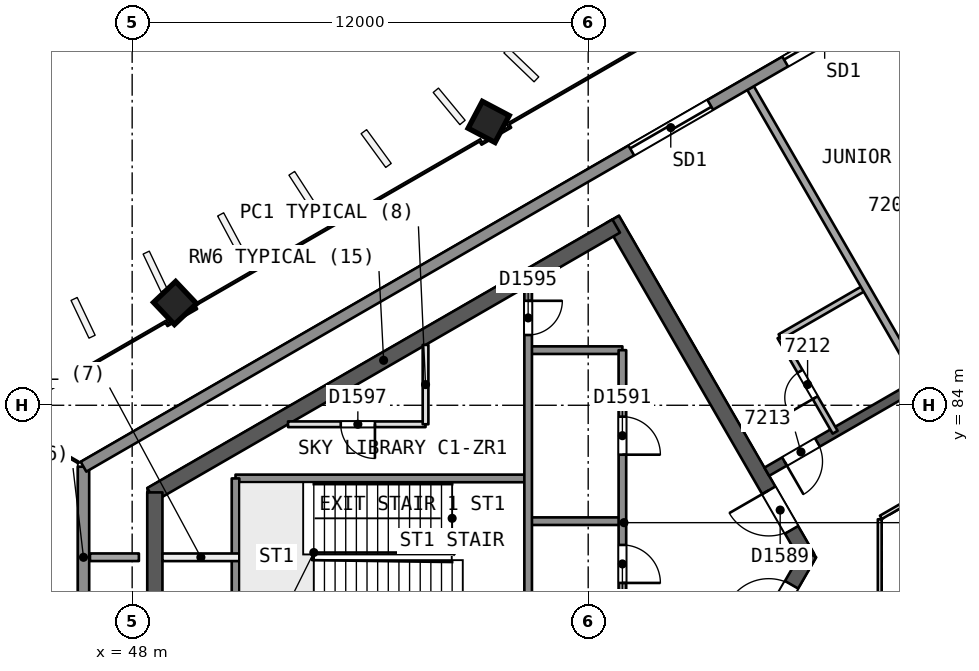
"""IFC4 building model, lengths in metres.
Left out: names, types, materials, properties, quantities, classifications, styles, units other than length and angle.
Written with IfcOpenShell. Run it as: python <this file> out.ifc"""

import sys

from ifc_helpers import new_model, si_unit, direction, frame, frame_2d, origin, origin_2d, place, context, subcontext, project, spatial, rectangle, extrude, element, fill, save


model = new_model("IFC4")
c1 = context("Model", 3, precision=1e-05, world=origin(), true_north=direction((0.0, 1.0)))
c2 = subcontext(c1, "Body", "Model", "MODEL_VIEW")
j1 = project(units=[si_unit("LENGTHUNIT", "METRE"), si_unit("PLANEANGLEUNIT", "RADIAN")], contexts=[c1])
p1 = place(None, origin())
s1 = spatial("IfcSite", under=j1, at=p1, CompositionType="ELEMENT")
p2 = place(p1, origin())
s2 = spatial("IfcBuilding", under=s1, at=p2, CompositionType="ELEMENT")
p3 = place(p2, frame((0.0, 0.0, 292.3)))
s3 = spatial("IfcBuildingStorey", under=s2, at=p3, CompositionType="ELEMENT", Elevation=292.3)
p4 = place(p3, frame((65.769, 80.0, 0.0), z_axis=(0.0, 0.0, 1.0), x_axis=(-0.50000177223, 0.866024380585, 0.0)))
e1 = element("IfcWall", 1, at=p4, inside=s3, PredefinedType="SHEAR", context=c2, shape_type="SweptSolid", body=[
    extrude(rectangle(XDim=10.265, YDim=0.4, at=frame_2d((5.132, 0.0))), origin(), (0.0, 0.0, 1.0), 3.7),
])
p5 = place(p4, frame((0.834, 0.0, 0.0)))
e2 = element("IfcOpeningElement", 2, at=p5, cuts=e1, PredefinedType="OPENING", context=c2, shape_type="SweptSolid", body=[
    extrude(rectangle(XDim=1.2, YDim=2.1, at=frame_2d((0.6, 1.05))), frame((0.0, 0.21, 0.0), z_axis=(0.0, -1.0, 0.0), x_axis=(1.0, 0.0, 0.0)), (0.0, 0.0, 1.0), 0.421),
])
p6 = place(p3, frame((60.737, 88.716, 0.0), z_axis=(0.0, 0.0, 1.0), x_axis=(-0.866028812667, -0.499994095595, 0.0)))
e3 = element("IfcWall", 3, at=p6, inside=s3, PredefinedType="SHEAR", context=c2, shape_type="SweptSolid", body=[
    extrude(rectangle(XDim=14.134, YDim=0.4, at=frame_2d((7.067, 0.0))), origin(), (0.0, 0.0, 1.0), 3.7),
])
p7 = place(p3, frame((48.597, 81.707, 0.0), z_axis=(0.0, 0.0, 1.0), x_axis=(0.0, -1.0, 0.0)))
e4 = element("IfcWall", 4, at=p7, inside=s3, PredefinedType="SHEAR", context=c2, shape_type="SweptSolid", body=[
    extrude(rectangle(XDim=3.53, YDim=0.4, at=frame_2d((1.765, 0.0))), origin(), (0.0, 0.0, 1.0), 3.7),
])
p8 = place(p3, frame((60.737, 71.284, 0.0), z_axis=(0.0, 0.0, 1.0), x_axis=(0.50000547566, 0.866022242388, 0.0)))
e5 = element("IfcWall", 5, at=p8, inside=s3, PredefinedType="SHEAR", context=c2, shape_type="SweptSolid", body=[
    extrude(rectangle(XDim=10.18, YDim=0.4, at=frame_2d((5.09, 0.0))), origin(), (0.0, 0.0, 1.0), 3.7),
])
p9 = place(p8, frame((8.03, 0.0, 0.0)))
e6 = element("IfcOpeningElement", 6, at=p9, cuts=e5, PredefinedType="OPENING", context=c2, shape_type="SweptSolid", body=[
    extrude(rectangle(XDim=1.2, YDim=2.1, at=frame_2d((0.6, 1.05))), frame((0.0, 0.21, 0.0), z_axis=(0.0, -1.0, 0.0), x_axis=(1.0, 0.0, 0.0)), (0.0, 0.0, 1.0), 0.421),
])
p10 = place(p3, frame((78.2, 90.046, 0.0), z_axis=(0.0, 0.0, 1.0), x_axis=(-0.866026492143, -0.499998114903, 0.0)))
e7 = element("IfcWall", 7, at=p10, inside=s3, PredefinedType="SHEAR", context=c2, shape_type="SweptSolid", body=[
    extrude(rectangle(XDim=15.588, YDim=0.25, at=frame_2d((7.794, 0.0))), origin(), (0.0, 0.0, 1.0), 3.35),
])
p11 = place(p10, frame((4.718, 0.0, 0.0)))
e8 = element("IfcOpeningElement", 8, at=p11, cuts=e7, PredefinedType="OPENING", context=c2, shape_type="SweptSolid", body=[
    extrude(rectangle(XDim=1.0, YDim=2.1, at=frame_2d((0.5, 1.05))), frame((0.0, 0.135, 0.0), z_axis=(0.0, -1.0, 0.0), x_axis=(1.0, 0.0, 0.0)), (0.0, 0.0, 1.0), 0.271),
])
p12 = place(p10, frame((9.374, 0.0, 0.0)))
e9 = element("IfcOpeningElement", 9, at=p12, cuts=e7, PredefinedType="OPENING", context=c2, shape_type="SweptSolid", body=[
    extrude(rectangle(XDim=1.0, YDim=2.1, at=frame_2d((0.5, 1.05))), frame((0.0, 0.135, 0.0), z_axis=(0.0, -1.0, 0.0), x_axis=(1.0, 0.0, 0.0)), (0.0, 0.0, 1.0), 0.271),
])
p13 = place(p10, frame((14.05, 0.0, 0.0)))
e10 = element("IfcOpeningElement", 10, at=p13, cuts=e7, PredefinedType="OPENING", context=c2, shape_type="SweptSolid", body=[
    extrude(rectangle(XDim=1.0, YDim=2.1, at=frame_2d((0.5, 1.05))), frame((0.0, 0.135, 0.0), z_axis=(0.0, -1.0, 0.0), x_axis=(1.0, 0.0, 0.0)), (0.0, 0.0, 1.0), 0.271),
])
p14 = place(p3, frame((57.359, 91.47, 0.0), z_axis=(0.019328516974, -0.012138044789, 0.999739504221), x_axis=(-0.500208848309, 0.865669585777, 0.020181088508)))
e11 = element("IfcColumn", 11, at=p14, inside=s3, PredefinedType="COLUMN", context=c2, shape_type="SweptSolid", body=[
    extrude(rectangle(XDim=0.8, YDim=0.8, at=origin_2d()), origin(), (0.0, 0.0, 1.0), 3.701),
])
p15 = place(p3, frame((49.094, 86.699, 0.0), z_axis=(0.028559101991, -0.006859460986, 0.999568569678), x_axis=(-0.498513358127, 0.866646856607, 0.020190534949)))
e12 = element("IfcColumn", 12, at=p15, inside=s3, PredefinedType="COLUMN", context=c2, shape_type="SweptSolid", body=[
    extrude(rectangle(XDim=0.8, YDim=0.8, at=origin_2d()), origin(), (0.0, 0.0, 1.0), 3.702),
])
p16 = place(p3, frame((64.272, 92.345, 0.0), z_axis=(0.0, 0.0, 1.0), x_axis=(0.500006420084, -0.866021697116, 0.0)))
e13 = element("IfcWall", 13, at=p16, inside=s3, PredefinedType="PARTITIONING", context=c2, shape_type="SweptSolid", body=[
    extrude(rectangle(XDim=8.956, YDim=0.2, at=frame_2d((4.478, 0.0))), origin(), (0.0, 0.0, 1.0), 3.35),
])
p17 = place(p3, frame((66.498, 83.29, 0.0), z_axis=(0.0, 0.0, 1.0), x_axis=(-0.499987231761, 0.866032775405, 0.0)))
e14 = element("IfcWall", 14, at=p17, inside=s3, PredefinedType="PARTITIONING", context=c2, shape_type="SweptSolid", body=[
    extrude(rectangle(XDim=2.9, YDim=0.15, at=frame_2d((1.45, 0.0))), origin(), (0.0, 0.0, 1.0), 3.35),
])
p18 = place(p17, frame((1.05, 0.0, 0.0)))
e15 = element("IfcOpeningElement", 15, at=p18, cuts=e14, PredefinedType="OPENING", context=c2, shape_type="SweptSolid", body=[
    extrude(rectangle(XDim=0.8, YDim=2.1, at=frame_2d((0.4, 1.05))), frame((0.0, 0.085, 0.0), z_axis=(0.0, -1.0, 0.0), x_axis=(1.0, 0.0, 0.0)), (0.0, 0.0, 1.0), 0.171),
])
p19 = place(p3, frame((65.048, 85.802, 0.0), z_axis=(0.0, 0.0, 1.0), x_axis=(0.866062058628, 0.499936506574, 0.0)))
e16 = element("IfcWall", 16, at=p19, inside=s3, PredefinedType="PARTITIONING", context=c2, shape_type="SweptSolid", body=[
    extrude(rectangle(XDim=2.6, YDim=0.15, at=frame_2d((1.3, 0.0))), origin(), (0.0, 0.0, 1.0), 3.35),
])
p20 = place(p3, frame((46.889, 80.001, 0.0), z_axis=(0.0, 0.0, 1.0), x_axis=(1.0, 0.0, 0.0)))
e17 = element("IfcWall", 17, at=p20, inside=s3, PredefinedType="PARTITIONING", context=c2, shape_type="SweptSolid", body=[
    extrude(rectangle(XDim=1.288, YDim=0.2, at=frame_2d((0.644, 0.0))), origin(), (0.0, 0.0, 1.0), 3.35),
])
p21 = place(p3, frame((46.719, 77.617, 0.0), z_axis=(0.0, 0.0, 1.0), x_axis=(0.0, 1.0, 0.0)))
e18 = element("IfcWall", 18, at=p21, inside=s3, PredefinedType="SOLIDWALL", context=c2, shape_type="SweptSolid", body=[
    extrude(rectangle(XDim=4.767, YDim=0.3, at=frame_2d((2.383, 0.0))), origin(), (0.0, 0.0, 1.0), 3.35),
])
p22 = place(p3, frame((46.719, 82.383, 0.0), z_axis=(0.0, 0.0, 1.0), x_axis=(0.866026104534, 0.499998786264, 0.0)))
e19 = element("IfcWall", 19, at=p22, inside=s3, PredefinedType="SOLIDWALL", context=c2, shape_type="SweptSolid", body=[
    extrude(rectangle(XDim=46.601, YDim=0.3, at=frame_2d((23.3, 0.0))), origin(), (0.0, 0.0, 1.0), 3.35),
])
p23 = place(p22, frame((16.644, 0.0, 0.0)))
e20 = element("IfcOpeningElement", 20, at=p23, cuts=e19, PredefinedType="OPENING", context=c2, shape_type="SweptSolid", body=[
    extrude(rectangle(XDim=2.4, YDim=2.4, at=frame_2d((1.2, 1.2))), frame((0.0, 0.161, 0.0), z_axis=(0.0, -1.0, 0.0), x_axis=(1.0, 0.0, 0.0)), (0.0, 0.0, 1.0), 0.321),
])
p24 = place(p22, frame((26.777, 0.0, 0.0)))
e21 = element("IfcOpeningElement", 21, at=p24, cuts=e19, PredefinedType="OPENING", context=c2, shape_type="SweptSolid", body=[
    extrude(rectangle(XDim=2.4, YDim=2.4, at=frame_2d((1.2, 1.2))), frame((0.0, 0.161, 0.0), z_axis=(0.0, -1.0, 0.0), x_axis=(1.0, 0.0, 0.0)), (0.0, 0.0, 1.0), 0.321),
])
p25 = place(p22, frame((21.321, 0.0, 0.0)))
e22 = element("IfcOpeningElement", 22, at=p25, cuts=e19, PredefinedType="OPENING", context=c2, shape_type="SweptSolid", body=[
    extrude(rectangle(XDim=2.4, YDim=2.4, at=frame_2d((1.2, 1.2))), frame((0.0, 0.161, 0.0), z_axis=(0.0, -1.0, 0.0), x_axis=(1.0, 0.0, 0.0)), (0.0, 0.0, 1.0), 0.321),
])
p26 = place(p3, frame((60.9, 85.45, 0.0), z_axis=(0.0, 0.0, 1.0), x_axis=(-1.0, 0.0, 0.0)))
e23 = element("IfcWall", 23, at=p26, inside=s3, PredefinedType="SOLIDWALL", context=c2, shape_type="SweptSolid", body=[
    extrude(rectangle(XDim=2.48, YDim=0.2, at=frame_2d((1.24, 0.0))), origin(), (0.0, 0.0, 1.0), 3.35),
])
p27 = place(p3, frame((55.72, 83.5, 0.0), z_axis=(0.0, 0.0, 1.0), x_axis=(-1.0, 0.0, 0.0)))
e24 = element("IfcWall", 24, at=p27, inside=s3, PredefinedType="PARTITIONING", context=c2, shape_type="SweptSolid", body=[
    extrude(rectangle(XDim=3.618, YDim=0.15, at=frame_2d((1.809, 0.0))), origin(), (0.0, 0.0, 1.0), 3.35),
])
p28 = place(p27, frame((1.332, 0.0, 0.0)))
e25 = element("IfcOpeningElement", 25, at=p28, cuts=e24, PredefinedType="OPENING", context=c2, shape_type="SweptSolid", body=[
    extrude(rectangle(XDim=0.9, YDim=2.1, at=frame_2d((0.45, 1.05))), frame((0.0, 0.085, 0.0), z_axis=(0.0, -1.0, 0.0), x_axis=(1.0, 0.0, 0.0)), (0.0, 0.0, 1.0), 0.171),
])
p29 = place(p3, frame((58.42, 82.075, 0.0), z_axis=(0.0, 0.0, 1.0), x_axis=(-1.0, 0.0, 0.0)))
e26 = element("IfcWall", 26, at=p29, inside=s3, PredefinedType="SOLIDWALL", context=c2, shape_type="SweptSolid", body=[
    extrude(rectangle(XDim=7.7, YDim=0.2, at=frame_2d((3.85, 0.0))), origin(), (0.0, 0.0, 1.0), 3.35),
])
p30 = place(p3, frame((60.9, 80.95, 0.0), z_axis=(0.0, 0.0, 1.0), x_axis=(-1.0, 0.0, 0.0)))
e27 = element("IfcWall", 27, at=p30, inside=s3, PredefinedType="SOLIDWALL", context=c2, shape_type="SweptSolid", body=[
    extrude(rectangle(XDim=2.48, YDim=0.2, at=frame_2d((1.24, 0.0))), origin(), (0.0, 0.0, 1.0), 3.35),
])
p31 = place(p3, frame((50.82, 80.0, 0.0), z_axis=(0.0, 0.0, 1.0), x_axis=(-1.0, 0.0, 0.0)))
e28 = element("IfcWall", 28, at=p31, inside=s3, PredefinedType="PARTITIONING", context=c2, shape_type="SweptSolid", body=[
    extrude(rectangle(XDim=2.023, YDim=0.2, at=frame_2d((1.012, 0.0))), origin(), (0.0, 0.0, 1.0), 3.35),
])
p32 = place(p3, frame((60.9, 85.45, 0.0), z_axis=(0.0, 0.0, 1.0), x_axis=(0.0, -1.0, 0.0)))
e29 = element("IfcWall", 29, at=p32, inside=s3, PredefinedType="SOLIDWALL", context=c2, shape_type="SweptSolid", body=[
    extrude(rectangle(XDim=10.9, YDim=0.2, at=frame_2d((5.45, 0.0))), origin(), (0.0, 0.0, 1.0), 3.35),
])
p33 = place(p32, frame((1.75, 0.0, 0.0)))
e30 = element("IfcOpeningElement", 30, at=p33, cuts=e29, PredefinedType="OPENING", context=c2, shape_type="SweptSolid", body=[
    extrude(rectangle(XDim=1.0, YDim=2.1, at=frame_2d((0.5, 1.05))), frame((0.0, 0.11, 0.0), z_axis=(0.0, -1.0, 0.0), x_axis=(1.0, 0.0, 0.0)), (0.0, 0.0, 1.0), 0.221),
])
p34 = place(p32, frame((5.125, 0.0, 0.0)))
e31 = element("IfcOpeningElement", 31, at=p34, cuts=e29, PredefinedType="OPENING", context=c2, shape_type="SweptSolid", body=[
    extrude(rectangle(XDim=1.0, YDim=2.1, at=frame_2d((0.5, 1.05))), frame((0.0, 0.11, 0.0), z_axis=(0.0, -1.0, 0.0), x_axis=(1.0, 0.0, 0.0)), (0.0, 0.0, 1.0), 0.221),
])
p35 = place(p32, frame((7.375, 0.0, 0.0)))
e32 = element("IfcOpeningElement", 32, at=p35, cuts=e29, PredefinedType="OPENING", context=c2, shape_type="SweptSolid", body=[
    extrude(rectangle(XDim=1.0, YDim=2.1, at=frame_2d((0.5, 1.05))), frame((0.0, 0.11, 0.0), z_axis=(0.0, -1.0, 0.0), x_axis=(1.0, 0.0, 0.0)), (0.0, 0.0, 1.0), 0.221),
])
p36 = place(p3, frame((58.42, 87.148, 0.0), z_axis=(0.0, 0.0, 1.0), x_axis=(0.0, -1.0, 0.0)))
e33 = element("IfcWall", 33, at=p36, inside=s3, PredefinedType="SOLIDWALL", context=c2, shape_type="SweptSolid", body=[
    extrude(rectangle(XDim=10.698, YDim=0.2, at=frame_2d((5.349, 0.0))), origin(), (0.0, 0.0, 1.0), 3.35),
])
p37 = place(p36, frame((0.399, 0.0, 0.0)))
e34 = element("IfcOpeningElement", 34, at=p37, cuts=e33, PredefinedType="OPENING", context=c2, shape_type="SweptSolid", body=[
    extrude(rectangle(XDim=0.9, YDim=2.1, at=frame_2d((0.45, 1.05))), frame((0.0, 0.11, 0.0), z_axis=(0.0, -1.0, 0.0), x_axis=(1.0, 0.0, 0.0)), (0.0, 0.0, 1.0), 0.221),
])
p38 = place(p3, frame((55.72, 85.589, 0.0), z_axis=(0.0, 0.0, 1.0), x_axis=(0.0, -1.0, 0.0)))
e35 = element("IfcWall", 35, at=p38, inside=s3, PredefinedType="PARTITIONING", context=c2, shape_type="SweptSolid", body=[
    extrude(rectangle(XDim=2.089, YDim=0.15, at=frame_2d((1.044, 0.0))), origin(), (0.0, 0.0, 1.0), 3.35),
])
p39 = place(p3, frame((50.72, 82.075, 0.0), z_axis=(0.0, 0.0, 1.0), x_axis=(0.0, -1.0, 0.0)))
e36 = element("IfcWall", 36, at=p39, inside=s3, PredefinedType="SOLIDWALL", context=c2, shape_type="SweptSolid", body=[
    extrude(rectangle(XDim=4.15, YDim=0.2, at=frame_2d((2.075, 0.0))), origin(), (0.0, 0.0, 1.0), 3.35),
])
p40 = place(p3, frame((77.738, 86.846, 0.0), z_axis=(0.0, 0.0, 1.0), x_axis=(-0.866026658274, -0.499997827154, 0.0)))
e37 = element("IfcWall", 37, at=p40, inside=s3, PredefinedType="PARTITIONING", context=c2, shape_type="SweptSolid", body=[
    extrude(rectangle(XDim=11.588, YDim=0.1, at=frame_2d((5.794, 0.0))), origin(), (0.0, 0.0, 1.0), 3.35),
])
p41 = place(p3, frame((67.672, 81.0, 0.0), z_axis=(0.0, 0.0, 1.0), x_axis=(0.0, -1.0, 0.0)))
e38 = element("IfcWall", 38, at=p41, inside=s3, PredefinedType="PARTITIONING", context=c2, shape_type="SweptSolid", body=[
    extrude(rectangle(XDim=2.0, YDim=0.1, at=frame_2d((1.0, 0.0))), origin(), (0.0, 0.0, 1.0), 3.35),
])
p42 = place(p18, origin())
e39 = element("IfcDoor", 39, at=p42, inside=s3, OperationType="SINGLE_SWING_LEFT", PredefinedType="NOTDEFINED", context=c2, shape_type="SweptSolid", body=[
    extrude(rectangle(XDim=0.8, YDim=2.1, at=frame_2d((0.4, 1.05))), frame((0.0, 0.025, 0.0), z_axis=(0.0, -1.0, 0.0), x_axis=(1.0, 0.0, 0.0)), (0.0, 0.0, 1.0), 0.05),
])
fill(e15, e39)
p43 = place(p13, origin())
e40 = element("IfcDoor", 40, at=p43, inside=s3, OperationType="SINGLE_SWING_RIGHT", PredefinedType="NOTDEFINED", context=c2, shape_type="SweptSolid", body=[
    extrude(rectangle(XDim=1.0, YDim=2.1, at=frame_2d((0.5, 1.05))), frame((0.0, 0.025, 0.0), z_axis=(0.0, -1.0, 0.0), x_axis=(1.0, 0.0, 0.0)), (0.0, 0.0, 1.0), 0.05),
])
fill(e10, e40)
p44 = place(p23, origin())
e41 = element("IfcDoor", 41, at=p44, inside=s3, OperationType="SLIDING_TO_LEFT", PredefinedType="NOTDEFINED", context=c2, shape_type="SweptSolid", body=[
    extrude(rectangle(XDim=2.4, YDim=2.4, at=frame_2d((1.2, 1.2))), frame((0.0, 0.025, 0.0), z_axis=(0.0, -1.0, 0.0), x_axis=(1.0, 0.0, 0.0)), (0.0, 0.0, 1.0), 0.05),
])
fill(e20, e41)
p45 = place(p25, origin())
e42 = element("IfcDoor", 42, at=p45, inside=s3, OperationType="SLIDING_TO_LEFT", PredefinedType="NOTDEFINED", context=c2, shape_type="SweptSolid", body=[
    extrude(rectangle(XDim=2.4, YDim=2.4, at=frame_2d((1.2, 1.2))), frame((0.0, 0.025, 0.0), z_axis=(0.0, -1.0, 0.0), x_axis=(1.0, 0.0, 0.0)), (0.0, 0.0, 1.0), 0.05),
])
fill(e22, e42)
p46 = place(p5, origin())
e43 = element("IfcDoor", 43, at=p46, inside=s3, OperationType="SINGLE_SWING_RIGHT", PredefinedType="NOTDEFINED", context=c2, shape_type="SweptSolid", body=[
    extrude(rectangle(XDim=1.2, YDim=2.1, at=frame_2d((0.6, 1.05))), frame((0.0, 0.025, 0.0), z_axis=(0.0, -1.0, 0.0), x_axis=(1.0, 0.0, 0.0)), (0.0, 0.0, 1.0), 0.05),
])
fill(e2, e43)
p47 = place(p9, origin())
e44 = element("IfcDoor", 44, at=p47, inside=s3, OperationType="SINGLE_SWING_LEFT", PredefinedType="NOTDEFINED", context=c2, shape_type="SweptSolid", body=[
    extrude(rectangle(XDim=1.2, YDim=2.1, at=frame_2d((0.6, 1.05))), frame((0.0, 0.025, 0.0), z_axis=(0.0, -1.0, 0.0), x_axis=(1.0, 0.0, 0.0)), (0.0, 0.0, 1.0), 0.05),
])
fill(e6, e44)
p48 = place(p33, origin())
e45 = element("IfcDoor", 45, at=p48, inside=s3, OperationType="SINGLE_SWING_RIGHT", PredefinedType="NOTDEFINED", context=c2, shape_type="SweptSolid", body=[
    extrude(rectangle(XDim=1.0, YDim=2.1, at=frame_2d((0.5, 1.05))), frame((0.0, 0.025, 0.0), z_axis=(0.0, -1.0, 0.0), x_axis=(1.0, 0.0, 0.0)), (0.0, 0.0, 1.0), 0.05),
])
fill(e30, e45)
p49 = place(p34, origin())
e46 = element("IfcDoor", 46, at=p49, inside=s3, OperationType="SINGLE_SWING_RIGHT", PredefinedType="NOTDEFINED", context=c2, shape_type="SweptSolid", body=[
    extrude(rectangle(XDim=1.0, YDim=2.1, at=frame_2d((0.5, 1.05))), frame((0.0, 0.025, 0.0), z_axis=(0.0, -1.0, 0.0), x_axis=(1.0, 0.0, 0.0)), (0.0, 0.0, 1.0), 0.05),
])
fill(e31, e46)
p50 = place(p37, origin())
e47 = element("IfcDoor", 47, at=p50, inside=s3, OperationType="SINGLE_SWING_LEFT", PredefinedType="NOTDEFINED", context=c2, shape_type="SweptSolid", body=[
    extrude(rectangle(XDim=0.9, YDim=2.1, at=frame_2d((0.45, 1.05))), frame((0.0, 0.025, 0.0), z_axis=(0.0, -1.0, 0.0), x_axis=(1.0, 0.0, 0.0)), (0.0, 0.0, 1.0), 0.05),
])
fill(e34, e47)
p51 = place(p28, origin())
e48 = element("IfcDoor", 48, at=p51, inside=s3, OperationType="SINGLE_SWING_LEFT", PredefinedType="NOTDEFINED", context=c2, shape_type="SweptSolid", body=[
    extrude(rectangle(XDim=0.9, YDim=2.1, at=frame_2d((0.45, 1.05))), frame((0.0, 0.025, 0.0), z_axis=(0.0, -1.0, 0.0), x_axis=(1.0, 0.0, 0.0)), (0.0, 0.0, 1.0), 0.05),
])
fill(e25, e48)
save(model, sys.argv[1])
